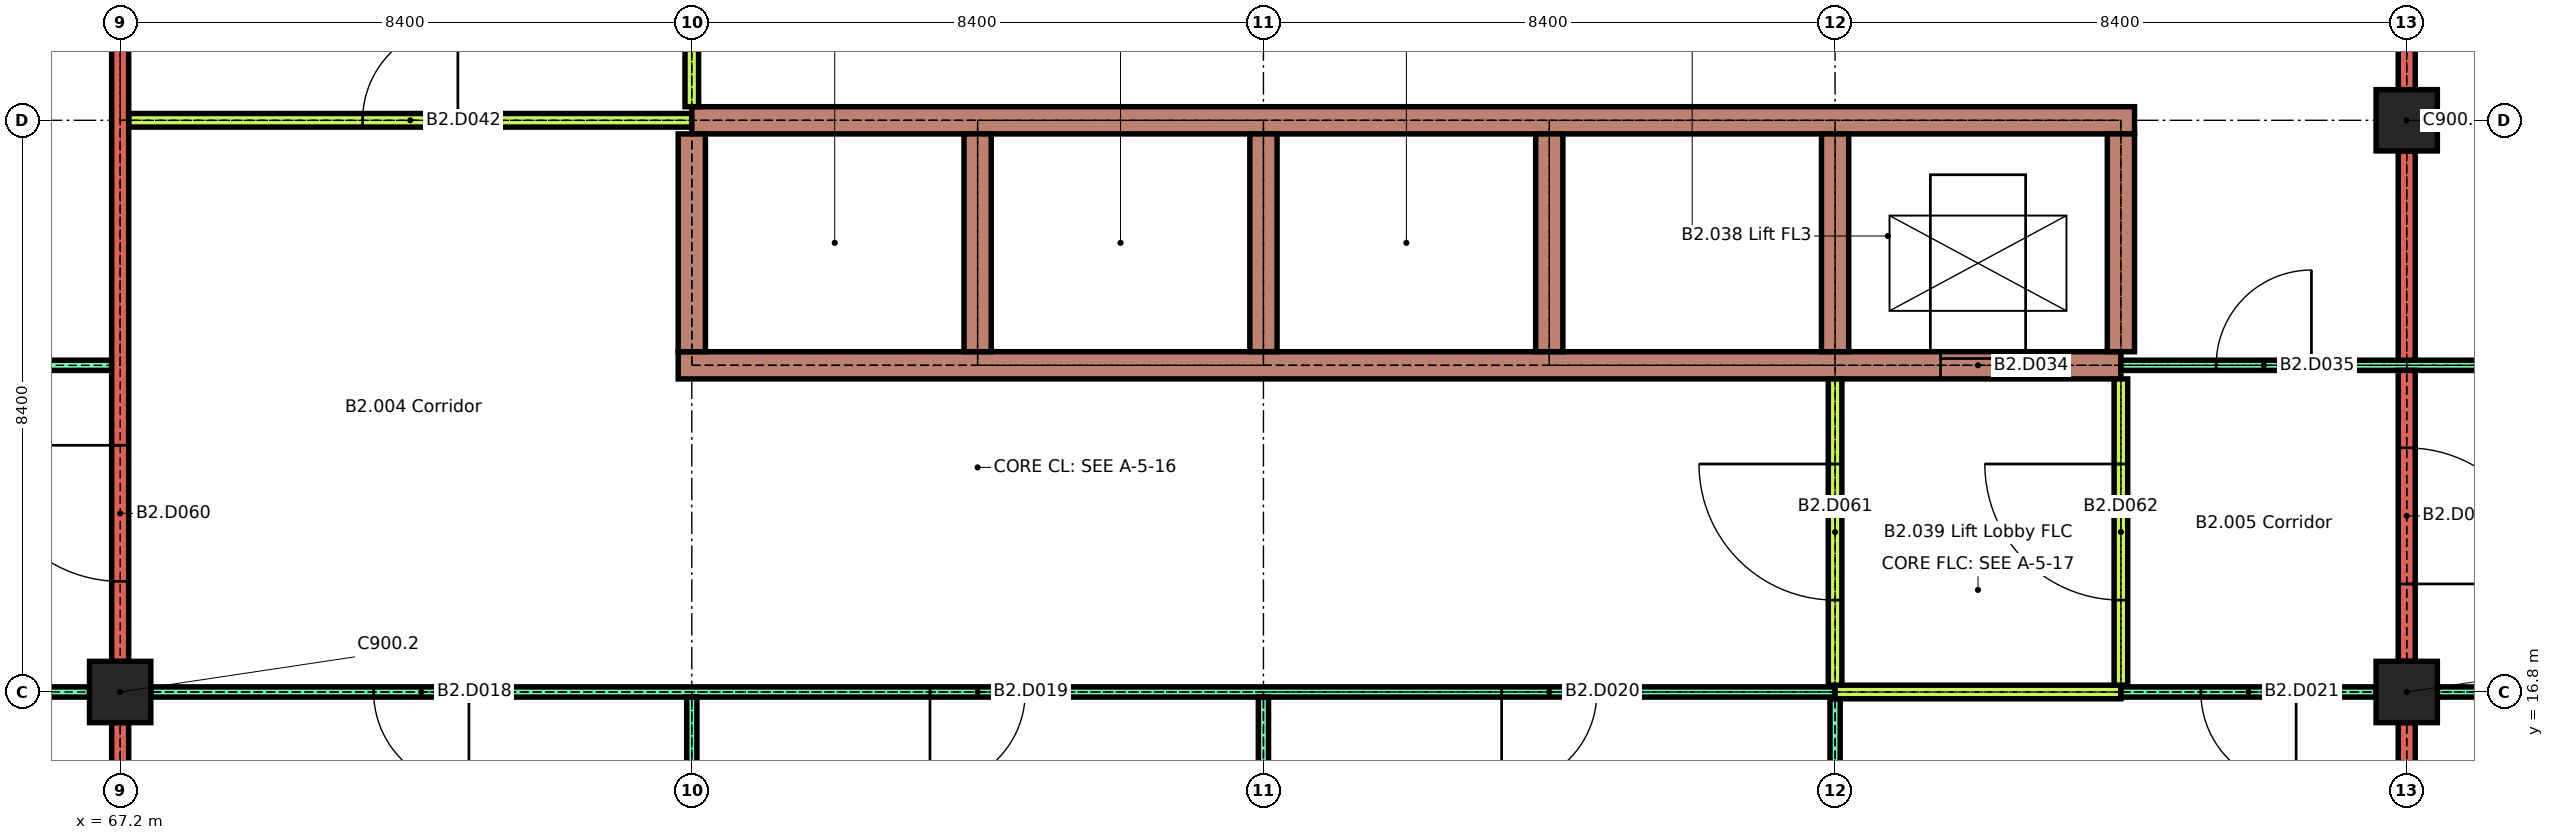
"""IFC4 building model, lengths in metres.
Left out: names, types, materials, properties, quantities, classifications, styles, units other than length and angle.
Written with IfcOpenShell. Run it as: python <this file> out.ifc"""

import sys

from ifc_helpers import new_model, si_unit, direction, frame, frame_2d, origin, origin_2d, place, context, subcontext, project, spatial, rectangle, extrude, element, fill, save


model = new_model("IFC4")
c1 = context("Model", 3, precision=1e-05, world=origin(), true_north=direction((0.0, 1.0)))
c2 = subcontext(c1, "Body", "Model", "MODEL_VIEW")
j1 = project(units=[si_unit("LENGTHUNIT", "METRE"), si_unit("PLANEANGLEUNIT", "RADIAN")], contexts=[c1])
p1 = place(None, origin())
s1 = spatial("IfcSite", under=j1, at=p1, CompositionType="ELEMENT")
p2 = place(p1, origin())
s2 = spatial("IfcBuilding", under=s1, at=p2, CompositionType="ELEMENT")
p3 = place(p2, frame((0.0, 0.0, -7.8)))
s3 = spatial("IfcBuildingStorey", under=s2, at=p3, CompositionType="ELEMENT", Elevation=-7.8)
for number, where, z_axis, x_axis in (
    (1, (67.2, 16.8, 0.0), (0.0, 0.0, 1.0), (1.0, 0.0, 0.0)),
    (2, (100.8, 16.8, 0.0), (0.0, 0.0, 1.0), (1.0, 0.0, 0.0)),
    (3, (100.8, 25.2, 0.0), (0.0, 0.0, 1.0), (1.0, 0.0, 0.0)),
):
    element("IfcColumn", number, at=place(p3, frame(where, z_axis=z_axis, x_axis=x_axis)), inside=s3, PredefinedType="COLUMN", context=c2, shape_type="SweptSolid", body=[
        extrude(rectangle(XDim=0.9, YDim=0.9, at=origin_2d()), origin(), (0.0, 0.0, 1.0), 3.1),
    ])
p4 = place(p3, frame((59.25, 16.8, 0.0), z_axis=(0.0, 0.0, 1.0), x_axis=(1.0, 0.0, 0.0)))
e4 = element("IfcWall", 4, at=p4, inside=s3, PredefinedType="PARTITIONING", context=c2, shape_type="SweptSolid", body=[
    extrude(rectangle(XDim=7.5, YDim=0.15, at=frame_2d((3.75, 0.0))), origin(), (0.0, 0.0, 1.0), 3.1),
])
p5 = place(p4, frame((3.05, 0.0, 0.0)))
e5 = element("IfcOpeningElement", 5, at=p5, cuts=e4, PredefinedType="OPENING", context=c2, shape_type="SweptSolid", body=[
    extrude(rectangle(XDim=1.4, YDim=2.1, at=frame_2d((0.7, 1.05))), frame((0.0, 0.085, 0.0), z_axis=(0.0, -1.0, 0.0), x_axis=(1.0, 0.0, 0.0)), (0.0, 0.0, 1.0), 0.17),
])
p6 = place(p3, frame((67.65, 16.8, 0.0), z_axis=(0.0, 0.0, 1.0), x_axis=(1.0, 0.0, 0.0)))
e6 = element("IfcWall", 6, at=p6, inside=s3, PredefinedType="PARTITIONING", context=c2, shape_type="SweptSolid", body=[
    extrude(rectangle(XDim=24.75, YDim=0.15, at=frame_2d((12.375, 0.0))), origin(), (0.0, 0.0, 1.0), 3.1),
])
p7 = place(p6, frame((3.275, 0.0, 0.0)))
e7 = element("IfcOpeningElement", 7, at=p7, cuts=e6, PredefinedType="OPENING", context=c2, shape_type="SweptSolid", body=[
    extrude(rectangle(XDim=1.4, YDim=2.1, at=frame_2d((0.7, 1.05))), frame((0.0, 0.085, 0.0), z_axis=(0.0, -1.0, 0.0), x_axis=(1.0, 0.0, 0.0)), (0.0, 0.0, 1.0), 0.17),
])
p8 = place(p6, frame((11.45, 0.0, 0.0)))
e8 = element("IfcOpeningElement", 8, at=p8, cuts=e6, PredefinedType="OPENING", context=c2, shape_type="SweptSolid", body=[
    extrude(rectangle(XDim=1.4, YDim=2.1, at=frame_2d((0.7, 1.05))), frame((0.0, 0.085, 0.0), z_axis=(0.0, -1.0, 0.0), x_axis=(1.0, 0.0, 0.0)), (0.0, 0.0, 1.0), 0.17),
])
p9 = place(p6, frame((19.85, 0.0, 0.0)))
e9 = element("IfcOpeningElement", 9, at=p9, cuts=e6, PredefinedType="OPENING", context=c2, shape_type="SweptSolid", body=[
    extrude(rectangle(XDim=1.4, YDim=2.1, at=frame_2d((0.7, 1.05))), frame((0.0, 0.085, 0.0), z_axis=(0.0, -1.0, 0.0), x_axis=(1.0, 0.0, 0.0)), (0.0, 0.0, 1.0), 0.17),
])
p10 = place(p3, frame((92.4, 16.8, 0.0), z_axis=(0.0, 0.0, 1.0), x_axis=(1.0, 0.0, 0.0)))
e10 = element("IfcWall", 10, at=p10, inside=s3, PredefinedType="PARTITIONING", context=c2, shape_type="SweptSolid", body=[
    extrude(rectangle(XDim=4.2, YDim=0.2, at=frame_2d((2.1, 0.0))), origin(), (0.0, 0.0, 1.0), 3.1),
])
p11 = place(p3, frame((96.6, 16.8, 0.0), z_axis=(0.0, 0.0, 1.0), x_axis=(1.0, 0.0, 0.0)))
e11 = element("IfcWall", 11, at=p11, inside=s3, PredefinedType="PARTITIONING", context=c2, shape_type="SweptSolid", body=[
    extrude(rectangle(XDim=3.75, YDim=0.15, at=frame_2d((1.875, 0.0))), origin(), (0.0, 0.0, 1.0), 3.1),
])
p12 = place(p11, frame((1.175, 0.0, 0.0)))
e12 = element("IfcOpeningElement", 12, at=p12, cuts=e11, PredefinedType="OPENING", context=c2, shape_type="SweptSolid", body=[
    extrude(rectangle(XDim=1.4, YDim=2.1, at=frame_2d((0.7, 1.05))), frame((0.0, 0.085, 0.0), z_axis=(0.0, -1.0, 0.0), x_axis=(1.0, 0.0, 0.0)), (0.0, 0.0, 1.0), 0.17),
])
p13 = place(p3, frame((101.25, 16.8, 0.0), z_axis=(0.0, 0.0, 1.0), x_axis=(1.0, 0.0, 0.0)))
e13 = element("IfcWall", 13, at=p13, inside=s3, PredefinedType="PARTITIONING", context=c2, shape_type="SweptSolid", body=[
    extrude(rectangle(XDim=7.5, YDim=0.15, at=frame_2d((3.75, 0.0))), origin(), (0.0, 0.0, 1.0), 3.1),
])
p14 = place(p13, frame((3.05, 0.0, 0.0)))
e14 = element("IfcOpeningElement", 14, at=p14, cuts=e13, PredefinedType="OPENING", context=c2, shape_type="SweptSolid", body=[
    extrude(rectangle(XDim=1.4, YDim=2.1, at=frame_2d((0.7, 1.05))), frame((0.0, 0.085, 0.0), z_axis=(0.0, -1.0, 0.0), x_axis=(1.0, 0.0, 0.0)), (0.0, 0.0, 1.0), 0.17),
])
p15 = place(p3, frame((58.725, 21.6, 0.0), z_axis=(0.0, 0.0, 1.0), x_axis=(1.0, 0.0, 0.0)))
e15 = element("IfcWall", 15, at=p15, inside=s3, PredefinedType="PARTITIONING", context=c2, shape_type="SweptSolid", body=[
    extrude(rectangle(XDim=8.35, YDim=0.15, at=frame_2d((4.175, 0.0))), origin(), (0.0, 0.0, 1.0), 3.1),
])
p16 = place(p15, frame((3.512, 0.0, 0.0)))
e16 = element("IfcOpeningElement", 16, at=p16, cuts=e15, PredefinedType="OPENING", context=c2, shape_type="SweptSolid", body=[
    extrude(rectangle(XDim=1.4, YDim=2.1, at=frame_2d((0.7, 1.05))), frame((0.0, 0.085, 0.0), z_axis=(0.0, -1.0, 0.0), x_axis=(1.0, 0.0, 0.0)), (0.0, 0.0, 1.0), 0.17),
])
p17 = place(p3, frame((75.4, 21.6, 0.0), z_axis=(0.0, 0.0, 1.0), x_axis=(1.0, 0.0, 0.0)))
e17 = element("IfcWall", 17, at=p17, inside=s3, PredefinedType="SHEAR", context=c2, shape_type="SweptSolid", body=[
    extrude(rectangle(XDim=21.2, YDim=0.4, at=frame_2d((10.6, 0.0))), origin(), (0.0, 0.0, 1.0), 3.1),
])
p18 = place(p17, frame((18.55, 0.0, 0.0)))
e18 = element("IfcOpeningElement", 18, at=p18, cuts=e17, PredefinedType="OPENING", context=c2, shape_type="SweptSolid", body=[
    extrude(rectangle(XDim=1.1, YDim=2.1, at=frame_2d((0.55, 1.05))), frame((0.0, 0.21, 0.0), z_axis=(0.0, -1.0, 0.0), x_axis=(1.0, 0.0, 0.0)), (0.0, 0.0, 1.0), 0.42),
])
p19 = place(p3, frame((96.6, 21.6, 0.0), z_axis=(0.0, 0.0, 1.0), x_axis=(1.0, 0.0, 0.0)))
e19 = element("IfcWall", 19, at=p19, inside=s3, PredefinedType="PARTITIONING", context=c2, shape_type="SweptSolid", body=[
    extrude(rectangle(XDim=8.475, YDim=0.15, at=frame_2d((4.237, 0.0))), origin(), (0.0, 0.0, 1.0), 3.1),
])
p20 = place(p19, frame((1.4, 0.0, 0.0)))
e20 = element("IfcOpeningElement", 20, at=p20, cuts=e19, PredefinedType="OPENING", context=c2, shape_type="SweptSolid", body=[
    extrude(rectangle(XDim=1.4, YDim=2.1, at=frame_2d((0.7, 1.05))), frame((0.0, 0.085, 0.0), z_axis=(0.0, -1.0, 0.0), x_axis=(1.0, 0.0, 0.0)), (0.0, 0.0, 1.0), 0.17),
])
p21 = place(p19, frame((5.6, 0.0, 0.0)))
e21 = element("IfcOpeningElement", 21, at=p21, cuts=e19, PredefinedType="OPENING", context=c2, shape_type="SweptSolid", body=[
    extrude(rectangle(XDim=1.4, YDim=2.1, at=frame_2d((0.7, 1.05))), frame((0.0, 0.085, 0.0), z_axis=(0.0, -1.0, 0.0), x_axis=(1.0, 0.0, 0.0)), (0.0, 0.0, 1.0), 0.17),
])
p22 = place(p3, frame((67.325, 25.2, 0.0), z_axis=(0.0, 0.0, 1.0), x_axis=(1.0, 0.0, 0.0)))
e22 = element("IfcWall", 22, at=p22, inside=s3, PredefinedType="PARTITIONING", context=c2, shape_type="SweptSolid", body=[
    extrude(rectangle(XDim=8.275, YDim=0.2, at=frame_2d((4.138, 0.0))), origin(), (0.0, 0.0, 1.0), 3.1),
])
p23 = place(p22, frame((3.438, 0.0, 0.0)))
e23 = element("IfcOpeningElement", 23, at=p23, cuts=e22, PredefinedType="OPENING", context=c2, shape_type="SweptSolid", body=[
    extrude(rectangle(XDim=1.4, YDim=2.1, at=frame_2d((0.7, 1.05))), frame((0.0, 0.11, 0.0), z_axis=(0.0, -1.0, 0.0), x_axis=(1.0, 0.0, 0.0)), (0.0, 0.0, 1.0), 0.22),
])
p24 = place(p3, frame((75.6, 25.2, 0.0), z_axis=(0.0, 0.0, 1.0), x_axis=(1.0, 0.0, 0.0)))
e24 = element("IfcWall", 24, at=p24, inside=s3, PredefinedType="SHEAR", context=c2, shape_type="SweptSolid", body=[
    extrude(rectangle(XDim=21.2, YDim=0.4, at=frame_2d((10.6, 0.0))), origin(), (0.0, 0.0, 1.0), 3.1),
])
p25 = place(p3, frame((67.2, 8.85, 0.0), z_axis=(0.0, 0.0, 1.0), x_axis=(0.0, 1.0, 0.0)))
e25 = element("IfcWall", 25, at=p25, inside=s3, PredefinedType="SOLIDWALL", context=c2, shape_type="SweptSolid", body=[
    extrude(rectangle(XDim=7.5, YDim=0.25, at=frame_2d((3.75, 0.0))), origin(), (0.0, 0.0, 1.0), 3.1),
])
p26 = place(p3, frame((67.2, 17.25, 0.0), z_axis=(0.0, 0.0, 1.0), x_axis=(0.0, 1.0, 0.0)))
e26 = element("IfcWall", 26, at=p26, inside=s3, PredefinedType="SOLIDWALL", context=c2, shape_type="SweptSolid", body=[
    extrude(rectangle(XDim=12.75, YDim=0.25, at=frame_2d((6.375, 0.0))), origin(), (0.0, 0.0, 1.0), 3.1),
])
p27 = place(p26, frame((1.175, 0.0, 0.0)))
e27 = element("IfcOpeningElement", 27, at=p27, cuts=e26, PredefinedType="OPENING", context=c2, shape_type="SweptSolid", body=[
    extrude(rectangle(XDim=2.0, YDim=2.4, at=frame_2d((1.0, 1.2))), frame((0.0, 0.135, 0.0), z_axis=(0.0, -1.0, 0.0), x_axis=(1.0, 0.0, 0.0)), (0.0, 0.0, 1.0), 0.27),
])
p28 = place(p3, frame((75.6, 8.85, 0.0), z_axis=(0.0, 0.0, 1.0), x_axis=(0.0, 1.0, 0.0)))
e28 = element("IfcWall", 28, at=p28, inside=s3, PredefinedType="PARTITIONING", context=c2, shape_type="SweptSolid", body=[
    extrude(rectangle(XDim=7.875, YDim=0.15, at=frame_2d((3.938, 0.0))), origin(), (0.0, 0.0, 1.0), 3.1),
])
p29 = place(p3, frame((75.6, 21.8, 0.0), z_axis=(0.0, 0.0, 1.0), x_axis=(0.0, 1.0, 0.0)))
e29 = element("IfcWall", 29, at=p29, inside=s3, PredefinedType="SHEAR", context=c2, shape_type="SweptSolid", body=[
    extrude(rectangle(XDim=3.2, YDim=0.4, at=frame_2d((1.6, 0.0))), origin(), (0.0, 0.0, 1.0), 3.1),
])
p30 = place(p3, frame((75.6, 25.4, 0.0), z_axis=(0.0, 0.0, 1.0), x_axis=(0.0, 1.0, 0.0)))
e30 = element("IfcWall", 30, at=p30, inside=s3, PredefinedType="PARTITIONING", context=c2, shape_type="SweptSolid", body=[
    extrude(rectangle(XDim=4.6, YDim=0.2, at=frame_2d((2.3, 0.0))), origin(), (0.0, 0.0, 1.0), 3.1),
])
p31 = place(p3, frame((79.8, 21.8, 0.0), z_axis=(0.0, 0.0, 1.0), x_axis=(0.0, 1.0, 0.0)))
e31 = element("IfcWall", 31, at=p31, inside=s3, PredefinedType="SHEAR", context=c2, shape_type="SweptSolid", body=[
    extrude(rectangle(XDim=3.2, YDim=0.4, at=frame_2d((1.6, 0.0))), origin(), (0.0, 0.0, 1.0), 3.1),
])
p32 = place(p3, frame((84.0, 8.85, 0.0), z_axis=(0.0, 0.0, 1.0), x_axis=(0.0, 1.0, 0.0)))
e32 = element("IfcWall", 32, at=p32, inside=s3, PredefinedType="PARTITIONING", context=c2, shape_type="SweptSolid", body=[
    extrude(rectangle(XDim=7.875, YDim=0.15, at=frame_2d((3.938, 0.0))), origin(), (0.0, 0.0, 1.0), 3.1),
])
for number, where, z_axis, x_axis in (
    (33, (84.0, 21.8, 0.0), (0.0, 0.0, 1.0), (0.0, 1.0, 0.0)),
    (34, (88.2, 21.8, 0.0), (0.0, 0.0, 1.0), (0.0, 1.0, 0.0)),
):
    element("IfcWall", number, at=place(p3, frame(where, z_axis=z_axis, x_axis=x_axis)), inside=s3, PredefinedType="SHEAR", context=c2, shape_type="SweptSolid", body=[
        extrude(rectangle(XDim=3.2, YDim=0.4, at=frame_2d((1.6, 0.0))), origin(), (0.0, 0.0, 1.0), 3.1),
    ])
p33 = place(p3, frame((92.4, 8.85, 0.0), z_axis=(0.0, 0.0, 1.0), x_axis=(0.0, 1.0, 0.0)))
e35 = element("IfcWall", 35, at=p33, inside=s3, PredefinedType="PARTITIONING", context=c2, shape_type="SweptSolid", body=[
    extrude(rectangle(XDim=7.85, YDim=0.15, at=frame_2d((3.925, 0.0))), origin(), (0.0, 0.0, 1.0), 3.1),
])
p34 = place(p3, frame((92.4, 16.9, 0.0), z_axis=(0.0, 0.0, 1.0), x_axis=(0.0, 1.0, 0.0)))
e36 = element("IfcWall", 36, at=p34, inside=s3, PredefinedType="PARTITIONING", context=c2, shape_type="SweptSolid", body=[
    extrude(rectangle(XDim=4.5, YDim=0.2, at=frame_2d((2.25, 0.0))), origin(), (0.0, 0.0, 1.0), 3.1),
])
p35 = place(p34, frame((1.25, 0.0, 0.0)))
e37 = element("IfcOpeningElement", 37, at=p35, cuts=e36, PredefinedType="OPENING", context=c2, shape_type="SweptSolid", body=[
    extrude(rectangle(XDim=2.0, YDim=2.4, at=frame_2d((1.0, 1.2))), frame((0.0, 0.11, 0.0), z_axis=(0.0, -1.0, 0.0), x_axis=(1.0, 0.0, 0.0)), (0.0, 0.0, 1.0), 0.22),
])
p36 = place(p3, frame((92.4, 21.8, 0.0), z_axis=(0.0, 0.0, 1.0), x_axis=(0.0, 1.0, 0.0)))
e38 = element("IfcWall", 38, at=p36, inside=s3, PredefinedType="SHEAR", context=c2, shape_type="SweptSolid", body=[
    extrude(rectangle(XDim=3.2, YDim=0.4, at=frame_2d((1.6, 0.0))), origin(), (0.0, 0.0, 1.0), 3.1),
])
p37 = place(p3, frame((96.6, 16.9, 0.0), z_axis=(0.0, 0.0, 1.0), x_axis=(0.0, 1.0, 0.0)))
e39 = element("IfcWall", 39, at=p37, inside=s3, PredefinedType="PARTITIONING", context=c2, shape_type="SweptSolid", body=[
    extrude(rectangle(XDim=4.5, YDim=0.2, at=frame_2d((2.25, 0.0))), origin(), (0.0, 0.0, 1.0), 3.1),
])
p38 = place(p37, frame((1.25, 0.0, 0.0)))
e40 = element("IfcOpeningElement", 40, at=p38, cuts=e39, PredefinedType="OPENING", context=c2, shape_type="SweptSolid", body=[
    extrude(rectangle(XDim=2.0, YDim=2.4, at=frame_2d((1.0, 1.2))), frame((0.0, 0.11, 0.0), z_axis=(0.0, -1.0, 0.0), x_axis=(1.0, 0.0, 0.0)), (0.0, 0.0, 1.0), 0.22),
])
p39 = place(p3, frame((96.6, 21.8, 0.0), z_axis=(0.0, 0.0, 1.0), x_axis=(0.0, 1.0, 0.0)))
e41 = element("IfcWall", 41, at=p39, inside=s3, PredefinedType="SHEAR", context=c2, shape_type="SweptSolid", body=[
    extrude(rectangle(XDim=3.2, YDim=0.4, at=frame_2d((1.6, 0.0))), origin(), (0.0, 0.0, 1.0), 3.1),
])
p40 = place(p3, frame((100.8, 8.85, 0.0), z_axis=(0.0, 0.0, 1.0), x_axis=(0.0, 1.0, 0.0)))
e42 = element("IfcWall", 42, at=p40, inside=s3, PredefinedType="SOLIDWALL", context=c2, shape_type="SweptSolid", body=[
    extrude(rectangle(XDim=7.5, YDim=0.25, at=frame_2d((3.75, 0.0))), origin(), (0.0, 0.0, 1.0), 3.1),
])
p41 = place(p3, frame((100.8, 17.25, 0.0), z_axis=(0.0, 0.0, 1.0), x_axis=(0.0, 1.0, 0.0)))
e43 = element("IfcWall", 43, at=p41, inside=s3, PredefinedType="SOLIDWALL", context=c2, shape_type="SweptSolid", body=[
    extrude(rectangle(XDim=4.275, YDim=0.25, at=frame_2d((2.137, 0.0))), origin(), (0.0, 0.0, 1.0), 3.1),
])
p42 = place(p41, frame((1.137, 0.0, 0.0)))
e44 = element("IfcOpeningElement", 44, at=p42, cuts=e43, PredefinedType="OPENING", context=c2, shape_type="SweptSolid", body=[
    extrude(rectangle(XDim=2.0, YDim=2.4, at=frame_2d((1.0, 1.2))), frame((0.0, 0.135, 0.0), z_axis=(0.0, -1.0, 0.0), x_axis=(1.0, 0.0, 0.0)), (0.0, 0.0, 1.0), 0.27),
])
p43 = place(p3, frame((100.8, 21.675, 0.0), z_axis=(0.0, 0.0, 1.0), x_axis=(0.0, 1.0, 0.0)))
e45 = element("IfcWall", 45, at=p43, inside=s3, PredefinedType="SOLIDWALL", context=c2, shape_type="SweptSolid", body=[
    extrude(rectangle(XDim=3.075, YDim=0.25, at=frame_2d((1.538, 0.0))), origin(), (0.0, 0.0, 1.0), 3.1),
])
p44 = place(p3, frame((100.8, 25.65, 0.0), z_axis=(0.0, 0.0, 1.0), x_axis=(0.0, 1.0, 0.0)))
e46 = element("IfcWall", 46, at=p44, inside=s3, PredefinedType="SOLIDWALL", context=c2, shape_type="SweptSolid", body=[
    extrude(rectangle(XDim=7.5, YDim=0.25, at=frame_2d((3.75, 0.0))), origin(), (0.0, 0.0, 1.0), 3.1),
])
p45 = place(p7, origin())
e47 = element("IfcDoor", 47, at=p45, inside=s3, OperationType="SINGLE_SWING_RIGHT", PredefinedType="DOOR", context=c2, shape_type="SweptSolid", body=[
    extrude(rectangle(XDim=1.4, YDim=2.1, at=frame_2d((0.7, 1.05))), frame((0.0, 0.025, 0.0), z_axis=(0.0, -1.0, 0.0), x_axis=(1.0, 0.0, 0.0)), (0.0, 0.0, 1.0), 0.05),
])
fill(e7, e47)
p46 = place(p8, origin())
e48 = element("IfcDoor", 48, at=p46, inside=s3, OperationType="SINGLE_SWING_LEFT", PredefinedType="DOOR", context=c2, shape_type="SweptSolid", body=[
    extrude(rectangle(XDim=1.4, YDim=2.1, at=frame_2d((0.7, 1.05))), frame((0.0, 0.025, 0.0), z_axis=(0.0, -1.0, 0.0), x_axis=(1.0, 0.0, 0.0)), (0.0, 0.0, 1.0), 0.05),
])
fill(e8, e48)
p47 = place(p9, origin())
e49 = element("IfcDoor", 49, at=p47, inside=s3, OperationType="SINGLE_SWING_LEFT", PredefinedType="DOOR", context=c2, shape_type="SweptSolid", body=[
    extrude(rectangle(XDim=1.4, YDim=2.1, at=frame_2d((0.7, 1.05))), frame((0.0, 0.025, 0.0), z_axis=(0.0, -1.0, 0.0), x_axis=(1.0, 0.0, 0.0)), (0.0, 0.0, 1.0), 0.05),
])
fill(e9, e49)
p48 = place(p12, origin())
e50 = element("IfcDoor", 50, at=p48, inside=s3, OperationType="SINGLE_SWING_RIGHT", PredefinedType="DOOR", context=c2, shape_type="SweptSolid", body=[
    extrude(rectangle(XDim=1.4, YDim=2.1, at=frame_2d((0.7, 1.05))), frame((0.0, 0.025, 0.0), z_axis=(0.0, -1.0, 0.0), x_axis=(1.0, 0.0, 0.0)), (0.0, 0.0, 1.0), 0.05),
])
fill(e12, e50)
p49 = place(p18, origin())
e51 = element("IfcDoor", 51, at=p49, inside=s3, OperationType="SLIDING_TO_LEFT", PredefinedType="DOOR", context=c2, shape_type="SweptSolid", body=[
    extrude(rectangle(XDim=1.1, YDim=2.1, at=frame_2d((0.55, 1.05))), frame((0.0, 0.025, 0.0), z_axis=(0.0, -1.0, 0.0), x_axis=(1.0, 0.0, 0.0)), (0.0, 0.0, 1.0), 0.05),
])
fill(e18, e51)
p50 = place(p20, origin())
e52 = element("IfcDoor", 52, at=p50, inside=s3, OperationType="SINGLE_SWING_LEFT", PredefinedType="DOOR", context=c2, shape_type="SweptSolid", body=[
    extrude(rectangle(XDim=1.4, YDim=2.1, at=frame_2d((0.7, 1.05))), frame((0.0, 0.025, 0.0), z_axis=(0.0, -1.0, 0.0), x_axis=(1.0, 0.0, 0.0)), (0.0, 0.0, 1.0), 0.05),
])
fill(e20, e52)
p51 = place(p23, origin())
e53 = element("IfcDoor", 53, at=p51, inside=s3, OperationType="SINGLE_SWING_LEFT", PredefinedType="DOOR", context=c2, shape_type="SweptSolid", body=[
    extrude(rectangle(XDim=1.4, YDim=2.1, at=frame_2d((0.7, 1.05))), frame((0.0, 0.03, 0.0), z_axis=(0.0, -1.0, 0.0), x_axis=(1.0, 0.0, 0.0)), (0.0, 0.0, 1.0), 0.06),
])
fill(e23, e53)
p52 = place(p27, origin())
e54 = element("IfcDoor", 54, at=p52, inside=s3, OperationType="SINGLE_SWING_LEFT", PredefinedType="DOOR", context=c2, shape_type="SweptSolid", body=[
    extrude(rectangle(XDim=2.0, YDim=2.4, at=frame_2d((1.0, 1.2))), frame((0.0, 0.03, 0.0), z_axis=(0.0, -1.0, 0.0), x_axis=(1.0, 0.0, 0.0)), (0.0, 0.0, 1.0), 0.06),
])
fill(e27, e54)
p53 = place(p35, origin())
e55 = element("IfcDoor", 55, at=p53, inside=s3, OperationType="SINGLE_SWING_LEFT", PredefinedType="DOOR", context=c2, shape_type="SweptSolid", body=[
    extrude(rectangle(XDim=2.0, YDim=2.4, at=frame_2d((1.0, 1.2))), frame((0.0, 0.03, 0.0), z_axis=(0.0, -1.0, 0.0), x_axis=(1.0, 0.0, 0.0)), (0.0, 0.0, 1.0), 0.06),
])
fill(e37, e55)
p54 = place(p38, origin())
e56 = element("IfcDoor", 56, at=p54, inside=s3, OperationType="SINGLE_SWING_LEFT", PredefinedType="DOOR", context=c2, shape_type="SweptSolid", body=[
    extrude(rectangle(XDim=2.0, YDim=2.4, at=frame_2d((1.0, 1.2))), frame((0.0, 0.03, 0.0), z_axis=(0.0, -1.0, 0.0), x_axis=(1.0, 0.0, 0.0)), (0.0, 0.0, 1.0), 0.06),
])
fill(e40, e56)
p55 = place(p42, origin())
e57 = element("IfcDoor", 57, at=p55, inside=s3, OperationType="SINGLE_SWING_LEFT", PredefinedType="DOOR", context=c2, shape_type="SweptSolid", body=[
    extrude(rectangle(XDim=2.0, YDim=2.4, at=frame_2d((1.0, 1.2))), frame((0.0, 0.03, 0.0), z_axis=(0.0, -1.0, 0.0), x_axis=(1.0, 0.0, 0.0)), (0.0, 0.0, 1.0), 0.06),
])
fill(e44, e57)
save(model, sys.argv[1])
